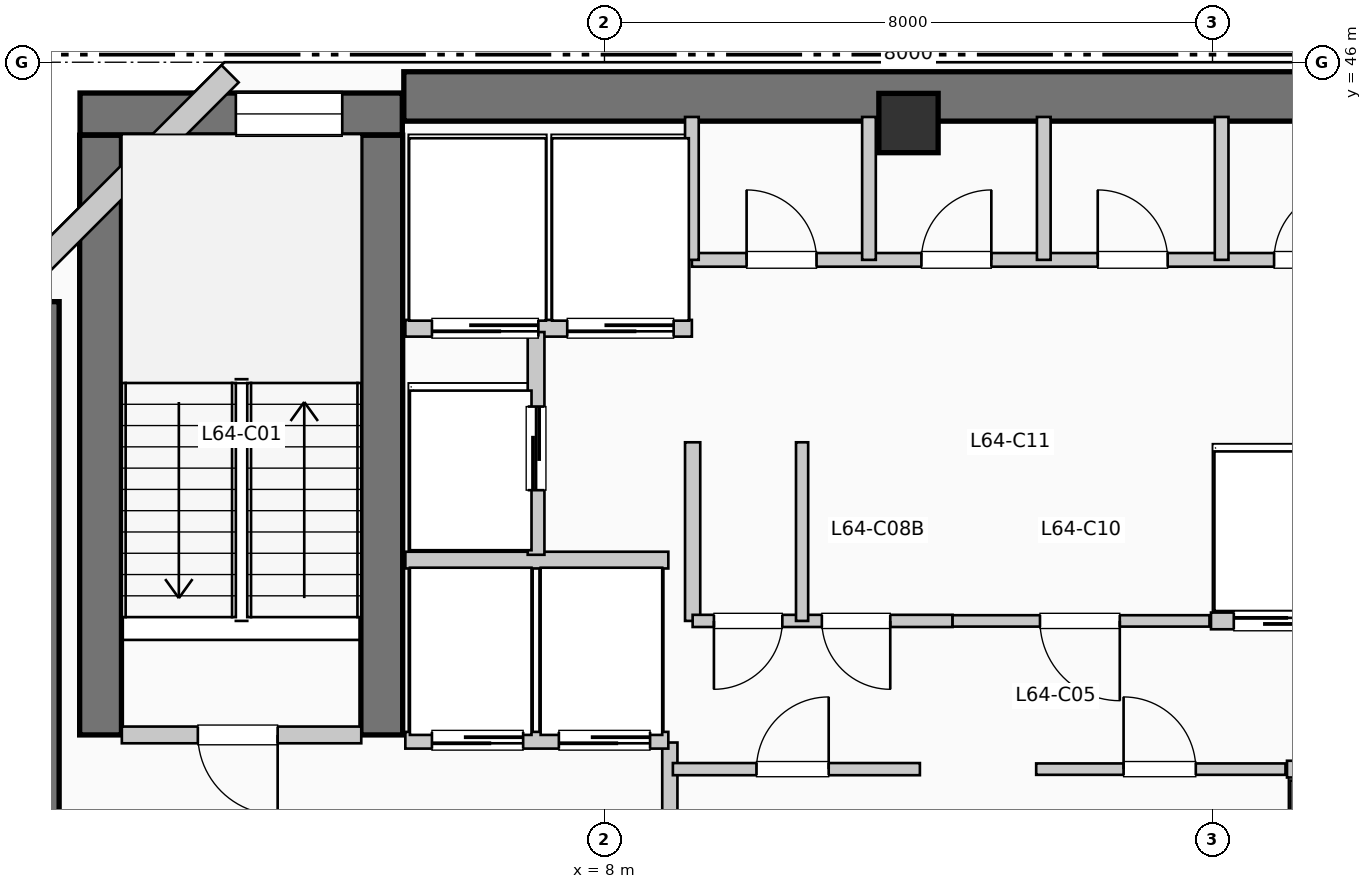
"""IFC4 building model, lengths in metres.
Left out: names, types, materials, properties, quantities, classifications, styles, units other than length and angle.
Written with IfcOpenShell. Run it as: python <this file> out.ifc"""

import sys

from ifc_helpers import new_model, si_unit, direction, frame, frame_2d, origin, origin_2d, place, context, subcontext, project, spatial, rectangle, extrude, element, fill, save


model = new_model("IFC4")
c1 = context("Model", 3, precision=1e-05, world=origin(), true_north=direction((0.0, 1.0)))
c2 = subcontext(c1, "Body", "Model", "MODEL_VIEW")
j1 = project(units=[si_unit("LENGTHUNIT", "METRE"), si_unit("PLANEANGLEUNIT", "RADIAN")], contexts=[c1])
p1 = place(None, origin())
s1 = spatial("IfcSite", under=j1, at=p1, CompositionType="ELEMENT")
p2 = place(p1, origin())
s2 = spatial("IfcBuilding", under=s1, at=p2, CompositionType="ELEMENT")
p3 = place(p2, frame((0.0, 0.0, 264.33)))
s3 = spatial("IfcBuildingStorey", under=s2, at=p3, CompositionType="ELEMENT", Elevation=264.33)
p4 = place(p3, frame((5.36, 45.55, 0.0), z_axis=(0.0, 0.0, 1.0), x_axis=(1.0, 0.0, 0.0)))
e1 = element("IfcWall", 1, at=p4, inside=s3, PredefinedType="SHEAR", context=c2, shape_type="SweptSolid", body=[
    extrude(rectangle(XDim=13.98, YDim=0.65, at=frame_2d((6.99, 0.0))), origin(), (0.0, 0.0, 1.0), 3.96),
])
p5 = place(p3, frame((0.5, 34.95, 0.0), z_axis=(0.0, 0.0, 1.0), x_axis=(0.0, 1.0, 0.0)))
e2 = element("IfcWall", 2, at=p5, inside=s3, PredefinedType="SHEAR", context=c2, shape_type="SweptSolid", body=[
    extrude(rectangle(XDim=7.9, YDim=0.65, at=frame_2d((3.95, 0.0))), origin(), (0.0, 0.0, 1.0), 3.96),
])
for number, where, z_axis, x_axis in (
    (3, (1.37, 37.15, 0.0), (0.0, 0.0, 1.0), (0.0, 1.0, 0.0)),
    (4, (5.07, 37.15, 0.0), (0.0, 0.0, 1.0), (0.0, 1.0, 0.0)),
):
    element("IfcWall", number, at=place(p3, frame(where, z_axis=z_axis, x_axis=x_axis)), inside=s3, PredefinedType="SHEAR", context=c2, shape_type="SweptSolid", body=[
        extrude(rectangle(XDim=7.89, YDim=0.55, at=frame_2d((3.945, 0.0))), origin(), (0.0, 0.0, 1.0), 3.96),
    ])
p6 = place(p3, frame((1.1, 45.32, 0.0), z_axis=(0.0, 0.0, 1.0), x_axis=(1.0, 0.0, 0.0)))
e5 = element("IfcWall", 5, at=p6, inside=s3, PredefinedType="SHEAR", context=c2, shape_type="SweptSolid", body=[
    extrude(rectangle(XDim=4.24, YDim=0.55, at=frame_2d((2.12, 0.0))), origin(), (0.0, 0.0, 1.0), 3.96),
])
p7 = place(p6, frame((2.05, 0.0, 1.05)))
e6 = element("IfcOpeningElement", 6, at=p7, cuts=e5, PredefinedType="OPENING", context=c2, shape_type="SweptSolid", body=[
    extrude(rectangle(XDim=1.4, YDim=1.8, at=frame_2d((0.7, 0.9))), frame((0.0, 0.285, 0.0), z_axis=(0.0, -1.0, 0.0), x_axis=(1.0, 0.0, 0.0)), (0.0, 0.0, 1.0), 0.57),
])
p8 = place(p3, frame((12.0, 45.2, 0.0), z_axis=(0.0, 0.0, 1.0), x_axis=(1.0, 0.0, 0.0)))
e7 = element("IfcColumn", 7, at=p8, inside=s3, PredefinedType="COLUMN", context=c2, shape_type="SweptSolid", body=[
    extrude(rectangle(XDim=0.78, YDim=0.78, at=origin_2d()), origin(), (0.0, 0.0, 1.0), 3.96),
])
p9 = place(p3, frame((3.074, 45.848, 0.0), z_axis=(0.0, 0.0, 1.0), x_axis=(-0.707106781187, -0.707106781187, 0.0)))
e8 = element("IfcWall", 8, at=p9, inside=s3, PredefinedType="SOLIDWALL", context=c2, shape_type="SweptSolid", body=[
    extrude(rectangle(XDim=4.133, YDim=0.32, at=frame_2d((2.066, 0.0))), origin(), (0.0, 0.0, 1.0), 3.71),
])
p10 = place(p3, frame((1.65, 37.15, 0.0), z_axis=(0.0, 0.0, 1.0), x_axis=(1.0, 0.0, 0.0)))
e9 = element("IfcWall", 9, at=p10, inside=s3, PredefinedType="PARTITIONING", context=c2, shape_type="SweptSolid", body=[
    extrude(rectangle(XDim=3.15, YDim=0.22, at=frame_2d((1.575, 0.0))), origin(), (0.0, 0.0, 1.0), 3.71),
])
p11 = place(p10, frame((2.05, 0.0, 0.0), z_axis=(0.0, 0.0, 1.0), x_axis=(-1.0, 0.0, 0.0)))
e10 = element("IfcOpeningElement", 10, at=p11, cuts=e9, PredefinedType="OPENING", context=c2, shape_type="SweptSolid", body=[
    extrude(rectangle(XDim=1.05, YDim=2.15, at=frame_2d((0.525, 1.075))), frame((0.0, 0.12, 0.0), z_axis=(0.0, -1.0, 0.0), x_axis=(1.0, 0.0, 0.0)), (0.0, 0.0, 1.0), 0.24),
])
p12 = place(p3, frame((8.86, 34.55, 0.0), z_axis=(0.0, 0.0, 1.0), x_axis=(0.0, 1.0, 0.0)))
e11 = element("IfcWall", 11, at=p12, inside=s3, PredefinedType="PARTITIONING", context=c2, shape_type="SweptSolid", body=[
    extrude(rectangle(XDim=2.5, YDim=0.2, at=frame_2d((1.25, 0.0))), origin(), (0.0, 0.0, 1.0), 3.71),
])
p13 = place(p3, frame((5.38, 37.08, 0.0), z_axis=(0.0, 0.0, 1.0), x_axis=(1.0, 0.0, 0.0)))
e12 = element("IfcWall", 12, at=p13, inside=s3, PredefinedType="PARTITIONING", context=c2, shape_type="SweptSolid", body=[
    extrude(rectangle(XDim=3.46, YDim=0.22, at=frame_2d((1.73, 0.0))), origin(), (0.0, 0.0, 1.0), 3.71),
])
p14 = place(p13, frame((1.55, 0.0, 0.0), z_axis=(0.0, 0.0, 1.0), x_axis=(-1.0, 0.0, 0.0)))
e13 = element("IfcOpeningElement", 13, at=p14, cuts=e12, PredefinedType="OPENING", context=c2, shape_type="SweptSolid", body=[
    extrude(rectangle(XDim=1.2, YDim=2.2, at=frame_2d((0.6, 1.1))), frame((0.0, 0.12, 0.0), z_axis=(0.0, -1.0, 0.0), x_axis=(1.0, 0.0, 0.0)), (0.0, 0.0, 1.0), 0.24),
])
p15 = place(p13, frame((3.22, 0.0, 0.0), z_axis=(0.0, 0.0, 1.0), x_axis=(-1.0, 0.0, 0.0)))
e14 = element("IfcOpeningElement", 14, at=p15, cuts=e12, PredefinedType="OPENING", context=c2, shape_type="SweptSolid", body=[
    extrude(rectangle(XDim=1.2, YDim=2.2, at=frame_2d((0.6, 1.1))), frame((0.0, 0.12, 0.0), z_axis=(0.0, -1.0, 0.0), x_axis=(1.0, 0.0, 0.0)), (0.0, 0.0, 1.0), 0.24),
])
p16 = place(p3, frame((5.38, 39.45, 0.0), z_axis=(0.0, 0.0, 1.0), x_axis=(1.0, 0.0, 0.0)))
e15 = element("IfcWall", 15, at=p16, inside=s3, PredefinedType="PARTITIONING", context=c2, shape_type="SweptSolid", body=[
    extrude(rectangle(XDim=3.46, YDim=0.22, at=frame_2d((1.73, 0.0))), origin(), (0.0, 0.0, 1.0), 3.71),
])
p17 = place(p3, frame((5.38, 42.5, 0.0), z_axis=(0.0, 0.0, 1.0), x_axis=(1.0, 0.0, 0.0)))
e16 = element("IfcWall", 16, at=p17, inside=s3, PredefinedType="PARTITIONING", context=c2, shape_type="SweptSolid", body=[
    extrude(rectangle(XDim=3.77, YDim=0.22, at=frame_2d((1.885, 0.0))), origin(), (0.0, 0.0, 1.0), 3.71),
])
p18 = place(p17, frame((1.75, 0.0, 0.0), z_axis=(0.0, 0.0, 1.0), x_axis=(-1.0, 0.0, 0.0)))
e17 = element("IfcOpeningElement", 17, at=p18, cuts=e16, PredefinedType="OPENING", context=c2, shape_type="SweptSolid", body=[
    extrude(rectangle(XDim=1.4, YDim=2.2, at=frame_2d((0.7, 1.1))), frame((0.0, 0.12, 0.0), z_axis=(0.0, -1.0, 0.0), x_axis=(1.0, 0.0, 0.0)), (0.0, 0.0, 1.0), 0.24),
])
p19 = place(p17, frame((3.53, 0.0, 0.0), z_axis=(0.0, 0.0, 1.0), x_axis=(-1.0, 0.0, 0.0)))
e18 = element("IfcOpeningElement", 18, at=p19, cuts=e16, PredefinedType="OPENING", context=c2, shape_type="SweptSolid", body=[
    extrude(rectangle(XDim=1.4, YDim=2.2, at=frame_2d((0.7, 1.1))), frame((0.0, 0.12, 0.0), z_axis=(0.0, -1.0, 0.0), x_axis=(1.0, 0.0, 0.0)), (0.0, 0.0, 1.0), 0.24),
])
p20 = place(p3, frame((7.1, 39.52, 0.0), z_axis=(0.0, 0.0, 1.0), x_axis=(0.0, 1.0, 0.0)))
e19 = element("IfcWall", 19, at=p20, inside=s3, PredefinedType="PARTITIONING", context=c2, shape_type="SweptSolid", body=[
    extrude(rectangle(XDim=2.93, YDim=0.22, at=frame_2d((1.465, 0.0))), origin(), (0.0, 0.0, 1.0), 3.71),
])
p21 = place(p20, frame((0.85, 0.0, 0.0)))
e20 = element("IfcOpeningElement", 20, at=p21, cuts=e19, PredefinedType="OPENING", context=c2, shape_type="SweptSolid", body=[
    extrude(rectangle(XDim=1.1, YDim=2.2, at=frame_2d((0.55, 1.1))), frame((0.0, 0.12, 0.0), z_axis=(0.0, -1.0, 0.0), x_axis=(1.0, 0.0, 0.0)), (0.0, 0.0, 1.0), 0.24),
])
p22 = place(p3, frame((9.16, 38.65, 0.0), z_axis=(0.0, 0.0, 1.0), x_axis=(0.0, 1.0, 0.0)))
e21 = element("IfcWall", 21, at=p22, inside=s3, PredefinedType="PARTITIONING", context=c2, shape_type="SweptSolid", body=[
    extrude(rectangle(XDim=2.35, YDim=0.2, at=frame_2d((1.175, 0.0))), origin(), (0.0, 0.0, 1.0), 3.71),
])
p23 = place(p3, frame((8.9, 36.7, 0.0), z_axis=(0.0, 0.0, 1.0), x_axis=(1.0, 0.0, 0.0)))
e22 = element("IfcWall", 22, at=p23, inside=s3, PredefinedType="PARTITIONING", context=c2, shape_type="SweptSolid", body=[
    extrude(rectangle(XDim=3.25, YDim=0.16, at=frame_2d((1.625, 0.0))), origin(), (0.0, 0.0, 1.0), 3.71),
])
p24 = place(p23, frame((1.1, 0.0, 0.0)))
e23 = element("IfcOpeningElement", 23, at=p24, cuts=e22, PredefinedType="OPENING", context=c2, shape_type="SweptSolid", body=[
    extrude(rectangle(XDim=0.95, YDim=2.15, at=frame_2d((0.475, 1.075))), frame((0.0, 0.09, 0.0), z_axis=(0.0, -1.0, 0.0), x_axis=(1.0, 0.0, 0.0)), (0.0, 0.0, 1.0), 0.18),
])
p25 = place(p3, frame((9.16, 38.65, 0.0), z_axis=(0.0, 0.0, 1.0), x_axis=(1.0, 0.0, 0.0)))
e24 = element("IfcWall", 24, at=p25, inside=s3, PredefinedType="PARTITIONING", context=c2, shape_type="SweptSolid", body=[
    extrude(rectangle(XDim=3.42, YDim=0.16, at=frame_2d((1.71, 0.0))), origin(), (0.0, 0.0, 1.0), 3.71),
])
p26 = place(p25, frame((1.18, 0.0, 0.0), z_axis=(0.0, 0.0, 1.0), x_axis=(-1.0, 0.0, 0.0)))
e25 = element("IfcOpeningElement", 25, at=p26, cuts=e24, PredefinedType="OPENING", context=c2, shape_type="SweptSolid", body=[
    extrude(rectangle(XDim=0.9, YDim=2.15, at=frame_2d((0.45, 1.075))), frame((0.0, 0.09, 0.0), z_axis=(0.0, -1.0, 0.0), x_axis=(1.0, 0.0, 0.0)), (0.0, 0.0, 1.0), 0.18),
])
p27 = place(p25, frame((2.6, 0.0, 0.0), z_axis=(0.0, 0.0, 1.0), x_axis=(-1.0, 0.0, 0.0)))
e26 = element("IfcOpeningElement", 26, at=p27, cuts=e24, PredefinedType="OPENING", context=c2, shape_type="SweptSolid", body=[
    extrude(rectangle(XDim=0.9, YDim=2.15, at=frame_2d((0.45, 1.075))), frame((0.0, 0.09, 0.0), z_axis=(0.0, -1.0, 0.0), x_axis=(1.0, 0.0, 0.0)), (0.0, 0.0, 1.0), 0.18),
])
p28 = place(p3, frame((10.6, 38.65, 0.0), z_axis=(0.0, 0.0, 1.0), x_axis=(0.0, 1.0, 0.0)))
e27 = element("IfcWall", 27, at=p28, inside=s3, PredefinedType="PARTITIONING", context=c2, shape_type="SweptSolid", body=[
    extrude(rectangle(XDim=2.35, YDim=0.16, at=frame_2d((1.175, 0.0))), origin(), (0.0, 0.0, 1.0), 3.71),
])
p29 = place(p3, frame((13.68, 36.7, 0.0), z_axis=(0.0, 0.0, 1.0), x_axis=(1.0, 0.0, 0.0)))
e28 = element("IfcWall", 28, at=p29, inside=s3, PredefinedType="PARTITIONING", context=c2, shape_type="SweptSolid", body=[
    extrude(rectangle(XDim=3.28, YDim=0.15, at=frame_2d((1.64, 0.0))), origin(), (0.0, 0.0, 1.0), 3.71),
])
p30 = place(p29, frame((1.15, 0.0, 0.0)))
e29 = element("IfcOpeningElement", 29, at=p30, cuts=e28, PredefinedType="OPENING", context=c2, shape_type="SweptSolid", body=[
    extrude(rectangle(XDim=0.95, YDim=2.15, at=frame_2d((0.475, 1.075))), frame((0.0, 0.085, 0.0), z_axis=(0.0, -1.0, 0.0), x_axis=(1.0, 0.0, 0.0)), (0.0, 0.0, 1.0), 0.17),
])
p31 = place(p3, frame((12.58, 38.65, 0.0), z_axis=(0.0, 0.0, 1.0), x_axis=(1.0, 0.0, 0.0)))
e30 = element("IfcWall", 30, at=p31, inside=s3, PredefinedType="PARTITIONING", context=c2, shape_type="SweptSolid", body=[
    extrude(rectangle(XDim=3.38, YDim=0.15, at=frame_2d((1.69, 0.0))), origin(), (0.0, 0.0, 1.0), 3.71),
])
p32 = place(p31, frame((2.2, 0.0, 0.0), z_axis=(0.0, 0.0, 1.0), x_axis=(-1.0, 0.0, 0.0)))
e31 = element("IfcOpeningElement", 31, at=p32, cuts=e30, PredefinedType="OPENING", context=c2, shape_type="SweptSolid", body=[
    extrude(rectangle(XDim=1.05, YDim=2.15, at=frame_2d((0.525, 1.075))), frame((0.0, 0.085, 0.0), z_axis=(0.0, -1.0, 0.0), x_axis=(1.0, 0.0, 0.0)), (0.0, 0.0, 1.0), 0.17),
])
p33 = place(p3, frame((16.98, 36.7, 0.0), z_axis=(0.0, 0.0, 1.0), x_axis=(1.0, 0.0, 0.0)))
e32 = element("IfcWall", 32, at=p33, inside=s3, PredefinedType="PARTITIONING", context=c2, shape_type="SweptSolid", body=[
    extrude(rectangle(XDim=1.7, YDim=0.22, at=frame_2d((0.85, 0.0))), origin(), (0.0, 0.0, 1.0), 3.71),
])
p34 = place(p33, frame((0.3, 0.0, 0.0)))
e33 = element("IfcOpeningElement", 33, at=p34, cuts=e32, PredefinedType="OPENING", context=c2, shape_type="SweptSolid", body=[
    extrude(rectangle(XDim=1.1, YDim=2.2, at=frame_2d((0.55, 1.1))), frame((0.0, 0.12, 0.0), z_axis=(0.0, -1.0, 0.0), x_axis=(1.0, 0.0, 0.0)), (0.0, 0.0, 1.0), 0.24),
])
p35 = place(p3, frame((15.98, 38.65, 0.0), z_axis=(0.0, 0.0, 1.0), x_axis=(1.0, 0.0, 0.0)))
e34 = element("IfcWall", 34, at=p35, inside=s3, PredefinedType="PARTITIONING", context=c2, shape_type="SweptSolid", body=[
    extrude(rectangle(XDim=1.72, YDim=0.22, at=frame_2d((0.86, 0.0))), origin(), (0.0, 0.0, 1.0), 3.71),
])
p36 = place(p35, frame((0.3, 0.0, 0.0)))
e35 = element("IfcOpeningElement", 35, at=p36, cuts=e34, PredefinedType="OPENING", context=c2, shape_type="SweptSolid", body=[
    extrude(rectangle(XDim=1.1, YDim=2.2, at=frame_2d((0.55, 1.1))), frame((0.0, 0.12, 0.0), z_axis=(0.0, -1.0, 0.0), x_axis=(1.0, 0.0, 0.0)), (0.0, 0.0, 1.0), 0.24),
])
p37 = place(p3, frame((9.15, 43.4, 0.0), z_axis=(0.0, 0.0, 1.0), x_axis=(1.0, 0.0, 0.0)))
e36 = element("IfcWall", 36, at=p37, inside=s3, PredefinedType="PLUMBINGWALL", context=c2, shape_type="SweptSolid", body=[
    extrude(rectangle(XDim=9.33, YDim=0.18, at=frame_2d((4.665, 0.0))), origin(), (0.0, 0.0, 1.0), 3.71),
])
p38 = place(p37, frame((0.72, 0.0, 0.0)))
e37 = element("IfcOpeningElement", 37, at=p38, cuts=e36, PredefinedType="OPENING", context=c2, shape_type="SweptSolid", body=[
    extrude(rectangle(XDim=0.92, YDim=2.1, at=frame_2d((0.46, 1.05))), frame((0.0, 0.1, 0.0), z_axis=(0.0, -1.0, 0.0), x_axis=(1.0, 0.0, 0.0)), (0.0, 0.0, 1.0), 0.2),
])
p39 = place(p37, frame((3.02, 0.0, 0.0)))
e38 = element("IfcOpeningElement", 38, at=p39, cuts=e36, PredefinedType="OPENING", context=c2, shape_type="SweptSolid", body=[
    extrude(rectangle(XDim=0.92, YDim=2.1, at=frame_2d((0.46, 1.05))), frame((0.0, 0.1, 0.0), z_axis=(0.0, -1.0, 0.0), x_axis=(1.0, 0.0, 0.0)), (0.0, 0.0, 1.0), 0.2),
])
p40 = place(p37, frame((5.34, 0.0, 0.0)))
e39 = element("IfcOpeningElement", 39, at=p40, cuts=e36, PredefinedType="OPENING", context=c2, shape_type="SweptSolid", body=[
    extrude(rectangle(XDim=0.92, YDim=2.1, at=frame_2d((0.46, 1.05))), frame((0.0, 0.1, 0.0), z_axis=(0.0, -1.0, 0.0), x_axis=(1.0, 0.0, 0.0)), (0.0, 0.0, 1.0), 0.2),
])
p41 = place(p37, frame((7.66, 0.0, 0.0)))
e40 = element("IfcOpeningElement", 40, at=p41, cuts=e36, PredefinedType="OPENING", context=c2, shape_type="SweptSolid", body=[
    extrude(rectangle(XDim=0.95, YDim=2.1, at=frame_2d((0.475, 1.05))), frame((0.0, 0.1, 0.0), z_axis=(0.0, -1.0, 0.0), x_axis=(1.0, 0.0, 0.0)), (0.0, 0.0, 1.0), 0.2),
])
for number, where, z_axis, x_axis in (
    (41, (9.15, 43.4, 0.0), (0.0, 0.0, 1.0), (0.0, 1.0, 0.0)),
    (42, (11.48, 43.4, 0.0), (0.0, 0.0, 1.0), (0.0, 1.0, 0.0)),
    (43, (13.78, 43.4, 0.0), (0.0, 0.0, 1.0), (0.0, 1.0, 0.0)),
    (44, (16.12, 43.4, 0.0), (0.0, 0.0, 1.0), (0.0, 1.0, 0.0)),
):
    element("IfcWall", number, at=place(p3, frame(where, z_axis=z_axis, x_axis=x_axis)), inside=s3, PredefinedType="PLUMBINGWALL", context=c2, shape_type="SweptSolid", body=[
        extrude(rectangle(XDim=1.88, YDim=0.18, at=frame_2d((0.94, 0.0))), origin(), (0.0, 0.0, 1.0), 3.71),
    ])
p42 = place(p7, origin())
e45 = element("IfcWindow", 45, at=p42, inside=s3, PartitioningType="SINGLE_PANEL", PredefinedType="WINDOW", context=c2, shape_type="SweptSolid", body=[
    extrude(rectangle(XDim=1.4, YDim=1.8, at=frame_2d((0.7, 0.9))), frame((0.0, 0.03, 0.0), z_axis=(0.0, -1.0, 0.0), x_axis=(1.0, 0.0, 0.0)), (0.0, 0.0, 1.0), 0.06),
])
fill(e6, e45)
p43 = place(p11, origin())
e46 = element("IfcDoor", 46, at=p43, inside=s3, OperationType="SINGLE_SWING_RIGHT", PredefinedType="DOOR", context=c2, shape_type="SweptSolid", body=[
    extrude(rectangle(XDim=1.05, YDim=2.15, at=frame_2d((0.525, 1.075))), frame((0.0, 0.025, 0.0), z_axis=(0.0, -1.0, 0.0), x_axis=(1.0, 0.0, 0.0)), (0.0, 0.0, 1.0), 0.05),
])
fill(e10, e46)
p44 = place(p14, origin())
e47 = element("IfcDoor", 47, at=p44, inside=s3, OperationType="SLIDING_TO_RIGHT", PredefinedType="DOOR", context=c2, shape_type="SweptSolid", body=[
    extrude(rectangle(XDim=1.2, YDim=2.2, at=frame_2d((0.6, 1.1))), frame((0.0, 0.025, 0.0), z_axis=(0.0, -1.0, 0.0), x_axis=(1.0, 0.0, 0.0)), (0.0, 0.0, 1.0), 0.05),
])
fill(e13, e47)
p45 = place(p15, origin())
e48 = element("IfcDoor", 48, at=p45, inside=s3, OperationType="SLIDING_TO_RIGHT", PredefinedType="DOOR", context=c2, shape_type="SweptSolid", body=[
    extrude(rectangle(XDim=1.2, YDim=2.2, at=frame_2d((0.6, 1.1))), frame((0.0, 0.025, 0.0), z_axis=(0.0, -1.0, 0.0), x_axis=(1.0, 0.0, 0.0)), (0.0, 0.0, 1.0), 0.05),
])
fill(e14, e48)
p46 = place(p18, origin())
e49 = element("IfcDoor", 49, at=p46, inside=s3, OperationType="SLIDING_TO_LEFT", PredefinedType="DOOR", context=c2, shape_type="SweptSolid", body=[
    extrude(rectangle(XDim=1.4, YDim=2.2, at=frame_2d((0.7, 1.1))), frame((0.0, 0.025, 0.0), z_axis=(0.0, -1.0, 0.0), x_axis=(1.0, 0.0, 0.0)), (0.0, 0.0, 1.0), 0.05),
])
fill(e17, e49)
p47 = place(p19, origin())
e50 = element("IfcDoor", 50, at=p47, inside=s3, OperationType="SLIDING_TO_LEFT", PredefinedType="DOOR", context=c2, shape_type="SweptSolid", body=[
    extrude(rectangle(XDim=1.4, YDim=2.2, at=frame_2d((0.7, 1.1))), frame((0.0, 0.025, 0.0), z_axis=(0.0, -1.0, 0.0), x_axis=(1.0, 0.0, 0.0)), (0.0, 0.0, 1.0), 0.05),
])
fill(e18, e50)
p48 = place(p21, origin())
e51 = element("IfcDoor", 51, at=p48, inside=s3, OperationType="SLIDING_TO_LEFT", PredefinedType="DOOR", context=c2, shape_type="SweptSolid", body=[
    extrude(rectangle(XDim=1.1, YDim=2.2, at=frame_2d((0.55, 1.1))), frame((0.0, 0.025, 0.0), z_axis=(0.0, -1.0, 0.0), x_axis=(1.0, 0.0, 0.0)), (0.0, 0.0, 1.0), 0.05),
])
fill(e20, e51)
p49 = place(p24, origin())
e52 = element("IfcDoor", 52, at=p49, inside=s3, OperationType="SINGLE_SWING_RIGHT", PredefinedType="DOOR", context=c2, shape_type="SweptSolid", body=[
    extrude(rectangle(XDim=0.95, YDim=2.15, at=frame_2d((0.475, 1.075))), frame((0.0, 0.025, 0.0), z_axis=(0.0, -1.0, 0.0), x_axis=(1.0, 0.0, 0.0)), (0.0, 0.0, 1.0), 0.05),
])
fill(e23, e52)
p50 = place(p26, origin())
e53 = element("IfcDoor", 53, at=p50, inside=s3, OperationType="SINGLE_SWING_LEFT", PredefinedType="DOOR", context=c2, shape_type="SweptSolid", body=[
    extrude(rectangle(XDim=0.9, YDim=2.15, at=frame_2d((0.45, 1.075))), frame((0.0, 0.025, 0.0), z_axis=(0.0, -1.0, 0.0), x_axis=(1.0, 0.0, 0.0)), (0.0, 0.0, 1.0), 0.05),
])
fill(e25, e53)
p51 = place(p27, origin())
e54 = element("IfcDoor", 54, at=p51, inside=s3, OperationType="SINGLE_SWING_RIGHT", PredefinedType="DOOR", context=c2, shape_type="SweptSolid", body=[
    extrude(rectangle(XDim=0.9, YDim=2.15, at=frame_2d((0.45, 1.075))), frame((0.0, 0.025, 0.0), z_axis=(0.0, -1.0, 0.0), x_axis=(1.0, 0.0, 0.0)), (0.0, 0.0, 1.0), 0.05),
])
fill(e26, e54)
p52 = place(p30, origin())
e55 = element("IfcDoor", 55, at=p52, inside=s3, OperationType="SINGLE_SWING_LEFT", PredefinedType="DOOR", context=c2, shape_type="SweptSolid", body=[
    extrude(rectangle(XDim=0.95, YDim=2.15, at=frame_2d((0.475, 1.075))), frame((0.0, 0.025, 0.0), z_axis=(0.0, -1.0, 0.0), x_axis=(1.0, 0.0, 0.0)), (0.0, 0.0, 1.0), 0.05),
])
fill(e29, e55)
p53 = place(p32, origin())
e56 = element("IfcDoor", 56, at=p53, inside=s3, OperationType="SINGLE_SWING_RIGHT", PredefinedType="DOOR", context=c2, shape_type="SweptSolid", body=[
    extrude(rectangle(XDim=1.05, YDim=2.15, at=frame_2d((0.525, 1.075))), frame((0.0, 0.025, 0.0), z_axis=(0.0, -1.0, 0.0), x_axis=(1.0, 0.0, 0.0)), (0.0, 0.0, 1.0), 0.05),
])
fill(e31, e56)
p54 = place(p36, origin())
e57 = element("IfcDoor", 57, at=p54, inside=s3, OperationType="SLIDING_TO_LEFT", PredefinedType="DOOR", context=c2, shape_type="SweptSolid", body=[
    extrude(rectangle(XDim=1.1, YDim=2.2, at=frame_2d((0.55, 1.1))), frame((0.0, 0.025, 0.0), z_axis=(0.0, -1.0, 0.0), x_axis=(1.0, 0.0, 0.0)), (0.0, 0.0, 1.0), 0.05),
])
fill(e35, e57)
p55 = place(p38, origin())
e58 = element("IfcDoor", 58, at=p55, inside=s3, OperationType="SINGLE_SWING_LEFT", PredefinedType="DOOR", context=c2, shape_type="SweptSolid", body=[
    extrude(rectangle(XDim=0.92, YDim=2.1, at=frame_2d((0.46, 1.05))), frame((0.0, 0.025, 0.0), z_axis=(0.0, -1.0, 0.0), x_axis=(1.0, 0.0, 0.0)), (0.0, 0.0, 1.0), 0.05),
])
fill(e37, e58)
p56 = place(p39, origin())
e59 = element("IfcDoor", 59, at=p56, inside=s3, OperationType="SINGLE_SWING_RIGHT", PredefinedType="DOOR", context=c2, shape_type="SweptSolid", body=[
    extrude(rectangle(XDim=0.92, YDim=2.1, at=frame_2d((0.46, 1.05))), frame((0.0, 0.025, 0.0), z_axis=(0.0, -1.0, 0.0), x_axis=(1.0, 0.0, 0.0)), (0.0, 0.0, 1.0), 0.05),
])
fill(e38, e59)
p57 = place(p40, origin())
e60 = element("IfcDoor", 60, at=p57, inside=s3, OperationType="SINGLE_SWING_LEFT", PredefinedType="DOOR", context=c2, shape_type="SweptSolid", body=[
    extrude(rectangle(XDim=0.92, YDim=2.1, at=frame_2d((0.46, 1.05))), frame((0.0, 0.025, 0.0), z_axis=(0.0, -1.0, 0.0), x_axis=(1.0, 0.0, 0.0)), (0.0, 0.0, 1.0), 0.05),
])
fill(e39, e60)
p58 = place(p41, origin())
e61 = element("IfcDoor", 61, at=p58, inside=s3, OperationType="SINGLE_SWING_RIGHT", PredefinedType="DOOR", context=c2, shape_type="SweptSolid", body=[
    extrude(rectangle(XDim=0.95, YDim=2.1, at=frame_2d((0.475, 1.05))), frame((0.0, 0.025, 0.0), z_axis=(0.0, -1.0, 0.0), x_axis=(1.0, 0.0, 0.0)), (0.0, 0.0, 1.0), 0.05),
])
fill(e40, e61)
save(model, sys.argv[1])
